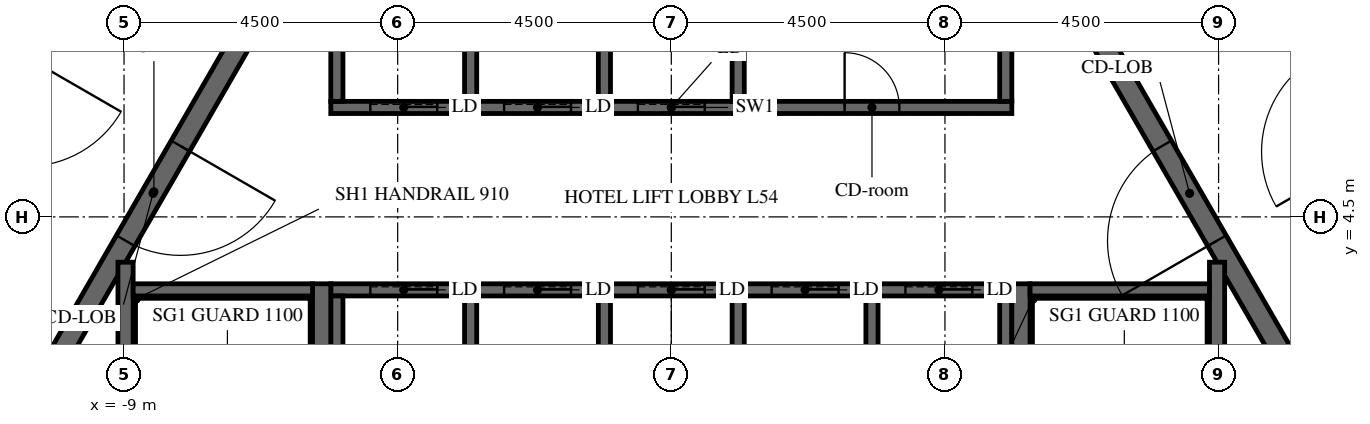
"""IFC4 building model, lengths in metres.
Left out: names, types, materials, properties, quantities, classifications, styles, units other than length and angle.
Written with IfcOpenShell. Run it as: python <this file> out.ifc"""

import sys

from ifc_helpers import new_model, si_unit, direction, frame, frame_2d, origin, place, context, subcontext, project, spatial, polyline, rectangle, outline, extrude, element, fill, save


model = new_model("IFC4")
c1 = context("Model", 3, precision=1e-05, world=origin(), true_north=direction((0.0, 1.0)))
c2 = subcontext(c1, "Body", "Model", "MODEL_VIEW")
j1 = project(units=[si_unit("LENGTHUNIT", "METRE"), si_unit("PLANEANGLEUNIT", "RADIAN")], contexts=[c1])
p1 = place(None, origin())
s1 = spatial("IfcSite", under=j1, at=p1, CompositionType="ELEMENT")
p2 = place(p1, origin())
s2 = spatial("IfcBuilding", under=s1, at=p2, CompositionType="ELEMENT")
p3 = place(p2, frame((0.0, 0.0, 226.8)))
s3 = spatial("IfcBuildingStorey", under=s2, at=p3, CompositionType="ELEMENT", Elevation=226.8)
p4 = place(p3, frame((-7.361, 12.75, -0.15), z_axis=(0.0, 0.0, 1.0), x_axis=(-0.50000571537, -0.866022103989, 0.0)))
e1 = element("IfcWall", 1, at=p4, inside=s3, PredefinedType="SHEAR", context=c2, shape_type="SweptSolid", body=[
    extrude(outline(polyline([(-0.144, -0.25), (14.867, -0.25), (14.578, 0.25), (0.144, 0.25), (-0.144, -0.25)])), origin(), (0.0, 0.0, 1.0), 3.9),
])
p5 = place(p4, frame((6.49, 0.0, 0.15)))
e2 = element("IfcOpeningElement", 2, at=p5, cuts=e1, PredefinedType="OPENING", context=c2, shape_type="SweptSolid", body=[
    extrude(rectangle(XDim=1.8, YDim=2.4, at=frame_2d((0.9, 1.2))), frame((0.0, 0.26, 0.0), z_axis=(0.0, -1.0, 0.0), x_axis=(1.0, 0.0, 0.0)), (0.0, 0.0, 1.0), 0.52),
])
p6 = place(p3, frame((14.722, 0.0, -0.15), z_axis=(0.0, 0.0, 1.0), x_axis=(-0.50000571537, 0.866022103989, 0.0)))
e3 = element("IfcWall", 3, at=p6, inside=s3, PredefinedType="SHEAR", context=c2, shape_type="SweptSolid", body=[
    extrude(outline(polyline([(-0.144, -0.25), (14.867, -0.25), (14.578, 0.25), (0.144, 0.25), (-0.144, -0.25)])), origin(), (0.0, 0.0, 1.0), 3.9),
])
p7 = place(p6, frame((6.432, 0.0, 0.15)))
e4 = element("IfcOpeningElement", 4, at=p7, cuts=e3, PredefinedType="OPENING", context=c2, shape_type="SweptSolid", body=[
    extrude(rectangle(XDim=1.8, YDim=2.4, at=frame_2d((0.9, 1.2))), frame((0.0, 0.26, 0.0), z_axis=(0.0, -1.0, 0.0), x_axis=(1.0, 0.0, 0.0)), (0.0, 0.0, 1.0), 0.52),
])
p8 = place(p3, frame((-5.673, 9.825, -0.15), z_axis=(0.0, 0.0, 1.0), x_axis=(-0.499995046907, -0.866028263435, 0.0)))
e5 = element("IfcWall", 5, at=p8, inside=s3, PredefinedType="SHEAR", context=c2, shape_type="SweptSolid", body=[
    extrude(outline(polyline([(-0.101, -0.175), (11.446, -0.175), (11.244, 0.175), (0.101, 0.175), (-0.101, -0.175)])), origin(), (0.0, 0.0, 1.0), 3.9),
])
p9 = place(p8, frame((4.801, 0.0, 0.15)))
e6 = element("IfcOpeningElement", 6, at=p9, cuts=e5, PredefinedType="OPENING", context=c2, shape_type="SweptSolid", body=[
    extrude(rectangle(XDim=1.8, YDim=2.4, at=frame_2d((0.9, 1.2))), frame((0.0, 0.185, 0.0), z_axis=(0.0, -1.0, 0.0), x_axis=(1.0, 0.0, 0.0)), (0.0, 0.0, 1.0), 0.37),
])
p10 = place(p3, frame((11.345, 0.0, -0.15), z_axis=(0.0, 0.0, 1.0), x_axis=(-0.499995046907, 0.866028263435, 0.0)))
e7 = element("IfcWall", 7, at=p10, inside=s3, PredefinedType="SHEAR", context=c2, shape_type="SweptSolid", body=[
    extrude(outline(polyline([(-0.101, -0.175), (11.446, -0.175), (11.244, 0.175), (0.101, 0.175), (-0.101, -0.175)])), origin(), (0.0, 0.0, 1.0), 3.9),
])
p11 = place(p10, frame((4.744, 0.0, 0.15)))
e8 = element("IfcOpeningElement", 8, at=p11, cuts=e7, PredefinedType="OPENING", context=c2, shape_type="SweptSolid", body=[
    extrude(rectangle(XDim=1.8, YDim=2.4, at=frame_2d((0.9, 1.2))), frame((0.0, 0.185, 0.0), z_axis=(0.0, -1.0, 0.0), x_axis=(1.0, 0.0, 0.0)), (0.0, 0.0, 1.0), 0.37),
])
p12 = place(p3, frame((-5.6, 6.3, -0.25), z_axis=(0.0, 0.0, 1.0), x_axis=(1.0, 0.0, 0.0)))
e9 = element("IfcWall", 9, at=p12, inside=s3, PredefinedType="SHEAR", context=c2, shape_type="SweptSolid", body=[
    extrude(rectangle(XDim=11.2, YDim=0.2, at=frame_2d((5.6, 0.0))), origin(), (0.0, 0.0, 1.0), 3.9),
])
p13 = place(p12, frame((8.45, 0.0, 0.25)))
e10 = element("IfcOpeningElement", 10, at=p13, cuts=e9, PredefinedType="OPENING", context=c2, shape_type="SweptSolid", body=[
    extrude(rectangle(XDim=0.9, YDim=2.1, at=frame_2d((0.45, 1.05))), frame((0.0, 0.11, 0.0), z_axis=(0.0, -1.0, 0.0), x_axis=(1.0, 0.0, 0.0)), (0.0, 0.0, 1.0), 0.22),
])
p14 = place(p12, frame((0.65, 0.0, 0.25)))
e11 = element("IfcOpeningElement", 11, at=p14, cuts=e9, PredefinedType="OPENING", context=c2, shape_type="SweptSolid", body=[
    extrude(rectangle(XDim=1.1, YDim=2.1, at=frame_2d((0.55, 1.05))), frame((0.0, 0.11, 0.0), z_axis=(0.0, -1.0, 0.0), x_axis=(1.0, 0.0, 0.0)), (0.0, 0.0, 1.0), 0.22),
])
p15 = place(p12, frame((2.85, 0.0, 0.25)))
e12 = element("IfcOpeningElement", 12, at=p15, cuts=e9, PredefinedType="OPENING", context=c2, shape_type="SweptSolid", body=[
    extrude(rectangle(XDim=1.1, YDim=2.1, at=frame_2d((0.55, 1.05))), frame((0.0, 0.11, 0.0), z_axis=(0.0, -1.0, 0.0), x_axis=(1.0, 0.0, 0.0)), (0.0, 0.0, 1.0), 0.22),
])
p16 = place(p12, frame((5.05, 0.0, 0.25)))
e13 = element("IfcOpeningElement", 13, at=p16, cuts=e9, PredefinedType="OPENING", context=c2, shape_type="SweptSolid", body=[
    extrude(rectangle(XDim=1.1, YDim=2.1, at=frame_2d((0.55, 1.05))), frame((0.0, 0.11, 0.0), z_axis=(0.0, -1.0, 0.0), x_axis=(1.0, 0.0, 0.0)), (0.0, 0.0, 1.0), 0.22),
])
for number, where, z_axis, x_axis in (
    (14, (-5.5, 6.4, -0.25), (0.0, 0.0, 1.0), (0.0, 1.0, 0.0)),
    (15, (-3.3, 6.4, -0.25), (0.0, 0.0, 1.0), (0.0, 1.0, 0.0)),
    (16, (-1.1, 6.4, -0.25), (0.0, 0.0, 1.0), (0.0, 1.0, 0.0)),
    (17, (1.1, 6.4, -0.25), (0.0, 0.0, 1.0), (0.0, 1.0, 0.0)),
    (18, (5.5, 6.4, -0.25), (0.0, 0.0, 1.0), (0.0, 1.0, 0.0)),
):
    element("IfcWall", number, at=place(p3, frame(where, z_axis=z_axis, x_axis=x_axis)), inside=s3, PredefinedType="SHEAR", context=c2, shape_type="SweptSolid", body=[
        extrude(rectangle(XDim=2.9, YDim=0.2, at=frame_2d((1.45, 0.0))), origin(), (0.0, 0.0, 1.0), 3.9),
    ])
p17 = place(p3, frame((-5.6, 3.3, -0.25), z_axis=(0.0, 0.0, 1.0), x_axis=(1.0, 0.0, 0.0)))
e19 = element("IfcWall", 19, at=p17, inside=s3, PredefinedType="SHEAR", context=c2, shape_type="SweptSolid", body=[
    extrude(rectangle(XDim=11.2, YDim=0.2, at=frame_2d((5.6, 0.0))), origin(), (0.0, 0.0, 1.0), 3.9),
])
p18 = place(p17, frame((0.65, 0.0, 0.25)))
e20 = element("IfcOpeningElement", 20, at=p18, cuts=e19, PredefinedType="OPENING", context=c2, shape_type="SweptSolid", body=[
    extrude(rectangle(XDim=1.1, YDim=2.1, at=frame_2d((0.55, 1.05))), frame((0.0, 0.11, 0.0), z_axis=(0.0, -1.0, 0.0), x_axis=(1.0, 0.0, 0.0)), (0.0, 0.0, 1.0), 0.22),
])
p19 = place(p17, frame((2.85, 0.0, 0.25)))
e21 = element("IfcOpeningElement", 21, at=p19, cuts=e19, PredefinedType="OPENING", context=c2, shape_type="SweptSolid", body=[
    extrude(rectangle(XDim=1.1, YDim=2.1, at=frame_2d((0.55, 1.05))), frame((0.0, 0.11, 0.0), z_axis=(0.0, -1.0, 0.0), x_axis=(1.0, 0.0, 0.0)), (0.0, 0.0, 1.0), 0.22),
])
p20 = place(p17, frame((5.05, 0.0, 0.25)))
e22 = element("IfcOpeningElement", 22, at=p20, cuts=e19, PredefinedType="OPENING", context=c2, shape_type="SweptSolid", body=[
    extrude(rectangle(XDim=1.1, YDim=2.1, at=frame_2d((0.55, 1.05))), frame((0.0, 0.11, 0.0), z_axis=(0.0, -1.0, 0.0), x_axis=(1.0, 0.0, 0.0)), (0.0, 0.0, 1.0), 0.22),
])
p21 = place(p17, frame((7.25, 0.0, 0.25)))
e23 = element("IfcOpeningElement", 23, at=p21, cuts=e19, PredefinedType="OPENING", context=c2, shape_type="SweptSolid", body=[
    extrude(rectangle(XDim=1.1, YDim=2.1, at=frame_2d((0.55, 1.05))), frame((0.0, 0.11, 0.0), z_axis=(0.0, -1.0, 0.0), x_axis=(1.0, 0.0, 0.0)), (0.0, 0.0, 1.0), 0.22),
])
p22 = place(p17, frame((9.45, 0.0, 0.25)))
e24 = element("IfcOpeningElement", 24, at=p22, cuts=e19, PredefinedType="OPENING", context=c2, shape_type="SweptSolid", body=[
    extrude(rectangle(XDim=1.1, YDim=2.1, at=frame_2d((0.55, 1.05))), frame((0.0, 0.11, 0.0), z_axis=(0.0, -1.0, 0.0), x_axis=(1.0, 0.0, 0.0)), (0.0, 0.0, 1.0), 0.22),
])
for number, where, z_axis, x_axis in (
    (25, (-5.5, 0.1, -0.25), (0.0, 0.0, 1.0), (0.0, 1.0, 0.0)),
    (26, (-3.3, 0.1, -0.25), (0.0, 0.0, 1.0), (0.0, 1.0, 0.0)),
    (27, (-1.1, 0.1, -0.25), (0.0, 0.0, 1.0), (0.0, 1.0, 0.0)),
    (28, (1.1, 0.1, -0.25), (0.0, 0.0, 1.0), (0.0, 1.0, 0.0)),
    (29, (3.3, 0.1, -0.25), (0.0, 0.0, 1.0), (0.0, 1.0, 0.0)),
    (30, (5.5, 0.1, -0.25), (0.0, 0.0, 1.0), (0.0, 1.0, 0.0)),
):
    element("IfcWall", number, at=place(p3, frame(where, z_axis=z_axis, x_axis=x_axis)), inside=s3, PredefinedType="SHEAR", context=c2, shape_type="SweptSolid", body=[
        extrude(rectangle(XDim=3.1, YDim=0.2, at=frame_2d((1.55, 0.0))), origin(), (0.0, 0.0, 1.0), 3.9),
    ])
p23 = place(p3, frame((5.75, -3.4, -0.25), z_axis=(0.0, 0.0, 1.0), x_axis=(0.0, 1.0, 0.0)))
e31 = element("IfcWall", 31, at=p23, inside=s3, PredefinedType="SHEAR", context=c2, shape_type="SweptSolid", body=[
    extrude(rectangle(XDim=6.8, YDim=0.3, at=frame_2d((3.4, 0.0))), origin(), (0.0, 0.0, 1.0), 3.9),
])
p24 = place(p3, frame((8.975, -3.755, -0.25), z_axis=(0.0, 0.0, 1.0), x_axis=(0.0, 1.0, 0.0)))
e32 = element("IfcWall", 32, at=p24, inside=s3, PredefinedType="SHEAR", context=c2, shape_type="SweptSolid", body=[
    extrude(rectangle(XDim=7.51, YDim=0.25, at=frame_2d((3.755, 0.0))), origin(), (0.0, 0.0, 1.0), 3.9),
])
p25 = place(p3, frame((5.9, 3.3, -0.25), z_axis=(0.0, 0.0, 1.0), x_axis=(1.0, 0.0, 0.0)))
e33 = element("IfcWall", 33, at=p25, inside=s3, PredefinedType="SHEAR", context=c2, shape_type="SweptSolid", body=[
    extrude(rectangle(XDim=2.95, YDim=0.2, at=frame_2d((1.475, 0.0))), origin(), (0.0, 0.0, 1.0), 3.9),
])
p26 = place(p3, frame((-5.75, -3.4, -0.25), z_axis=(0.0, 0.0, 1.0), x_axis=(0.0, 1.0, 0.0)))
e34 = element("IfcWall", 34, at=p26, inside=s3, PredefinedType="SHEAR", context=c2, shape_type="SweptSolid", body=[
    extrude(rectangle(XDim=6.8, YDim=0.3, at=frame_2d((3.4, 0.0))), origin(), (0.0, 0.0, 1.0), 3.9),
])
p27 = place(p3, frame((-8.975, -3.755, -0.25), z_axis=(0.0, 0.0, 1.0), x_axis=(0.0, 1.0, 0.0)))
e35 = element("IfcWall", 35, at=p27, inside=s3, PredefinedType="SHEAR", context=c2, shape_type="SweptSolid", body=[
    extrude(rectangle(XDim=7.51, YDim=0.25, at=frame_2d((3.755, 0.0))), origin(), (0.0, 0.0, 1.0), 3.9),
])
p28 = place(p3, frame((-8.85, 3.3, -0.25), z_axis=(0.0, 0.0, 1.0), x_axis=(1.0, 0.0, 0.0)))
e36 = element("IfcWall", 36, at=p28, inside=s3, PredefinedType="SHEAR", context=c2, shape_type="SweptSolid", body=[
    extrude(rectangle(XDim=2.95, YDim=0.2, at=frame_2d((1.475, 0.0))), origin(), (0.0, 0.0, 1.0), 3.9),
])
p29 = place(p3, frame((-8.588, 14.725, 0.0), z_axis=(0.0, 0.0, 1.0), x_axis=(-0.499999926766, -0.866025446066, 0.0)))
e37 = element("IfcWall", 37, at=p29, inside=s3, PredefinedType="PARTITIONING", context=c2, shape_type="SweptSolid", body=[
    extrude(rectangle(XDim=13.786, YDim=0.15, at=frame_2d((6.893, 0.0))), origin(), (0.0, 0.0, 1.0), 2.988),
])
p30 = place(p29, frame((4.276, 0.0, 0.0)))
e38 = element("IfcOpeningElement", 38, at=p30, cuts=e37, PredefinedType="OPENING", context=c2, shape_type="SweptSolid", body=[
    extrude(rectangle(XDim=1.0, YDim=2.1, at=frame_2d((0.5, 1.05))), frame((0.0, 0.085, 0.0), z_axis=(0.0, -1.0, 0.0), x_axis=(1.0, 0.0, 0.0)), (0.0, 0.0, 1.0), 0.17),
])
p31 = place(p29, frame((11.073, 0.0, 0.0)))
e39 = element("IfcOpeningElement", 39, at=p31, cuts=e37, PredefinedType="OPENING", context=c2, shape_type="SweptSolid", body=[
    extrude(rectangle(XDim=1.0, YDim=2.1, at=frame_2d((0.5, 1.05))), frame((0.0, 0.085, 0.0), z_axis=(0.0, -1.0, 0.0), x_axis=(1.0, 0.0, 0.0)), (0.0, 0.0, 1.0), 0.17),
])
p32 = place(p3, frame((17.046, 0.075, 0.0), z_axis=(0.0, 0.0, 1.0), x_axis=(-0.499996322767, 0.866027526826, 0.0)))
e40 = element("IfcWall", 40, at=p32, inside=s3, PredefinedType="PARTITIONING", context=c2, shape_type="SweptSolid", body=[
    extrude(rectangle(XDim=14.636, YDim=0.15, at=frame_2d((7.318, 0.0))), origin(), (0.0, 0.0, 1.0), 2.988),
])
p33 = place(p32, frame((1.781, 0.0, 0.0)))
e41 = element("IfcOpeningElement", 41, at=p33, cuts=e40, PredefinedType="OPENING", context=c2, shape_type="SweptSolid", body=[
    extrude(rectangle(XDim=1.0, YDim=2.1, at=frame_2d((0.5, 1.05))), frame((0.0, 0.085, 0.0), z_axis=(0.0, -1.0, 0.0), x_axis=(1.0, 0.0, 0.0)), (0.0, 0.0, 1.0), 0.17),
])
p34 = place(p32, frame((7.872, 0.0, 0.0)))
e42 = element("IfcOpeningElement", 42, at=p34, cuts=e40, PredefinedType="OPENING", context=c2, shape_type="SweptSolid", body=[
    extrude(rectangle(XDim=1.0, YDim=2.1, at=frame_2d((0.5, 1.05))), frame((0.0, 0.085, 0.0), z_axis=(0.0, -1.0, 0.0), x_axis=(1.0, 0.0, 0.0)), (0.0, 0.0, 1.0), 0.17),
])
p35 = place(p32, frame((13.203, 0.0, 0.0)))
e43 = element("IfcOpeningElement", 43, at=p35, cuts=e40, PredefinedType="OPENING", context=c2, shape_type="SweptSolid", body=[
    extrude(rectangle(XDim=1.0, YDim=2.1, at=frame_2d((0.5, 1.05))), frame((0.0, 0.085, 0.0), z_axis=(0.0, -1.0, 0.0), x_axis=(1.0, 0.0, 0.0)), (0.0, 0.0, 1.0), 0.17),
])
p36 = place(p9, origin())
e44 = element("IfcDoor", 44, at=p36, inside=s3, OperationType="DOUBLE_DOOR_SINGLE_SWING", PredefinedType="DOOR", context=c2, shape_type="SweptSolid", body=[
    extrude(rectangle(XDim=1.8, YDim=2.4, at=frame_2d((0.9, 1.2))), frame((0.0, 0.025, 0.0), z_axis=(0.0, -1.0, 0.0), x_axis=(1.0, 0.0, 0.0)), (0.0, 0.0, 1.0), 0.05),
])
fill(e6, e44)
p37 = place(p11, origin())
e45 = element("IfcDoor", 45, at=p37, inside=s3, OperationType="DOUBLE_DOOR_SINGLE_SWING", PredefinedType="DOOR", context=c2, shape_type="SweptSolid", body=[
    extrude(rectangle(XDim=1.8, YDim=2.4, at=frame_2d((0.9, 1.2))), frame((0.0, 0.025, 0.0), z_axis=(0.0, -1.0, 0.0), x_axis=(1.0, 0.0, 0.0)), (0.0, 0.0, 1.0), 0.05),
])
fill(e8, e45)
p38 = place(p13, origin())
e46 = element("IfcDoor", 46, at=p38, inside=s3, OperationType="SINGLE_SWING_LEFT", PredefinedType="DOOR", context=c2, shape_type="SweptSolid", body=[
    extrude(rectangle(XDim=0.9, YDim=2.1, at=frame_2d((0.45, 1.05))), frame((0.0, 0.025, 0.0), z_axis=(0.0, -1.0, 0.0), x_axis=(1.0, 0.0, 0.0)), (0.0, 0.0, 1.0), 0.05),
])
fill(e10, e46)
p39 = place(p14, origin())
e47 = element("IfcDoor", 47, at=p39, inside=s3, OperationType="SLIDING_TO_LEFT", PredefinedType="DOOR", context=c2, shape_type="SweptSolid", body=[
    extrude(rectangle(XDim=1.1, YDim=2.1, at=frame_2d((0.55, 1.05))), frame((0.0, 0.025, 0.0), z_axis=(0.0, -1.0, 0.0), x_axis=(1.0, 0.0, 0.0)), (0.0, 0.0, 1.0), 0.05),
])
fill(e11, e47)
p40 = place(p15, origin())
e48 = element("IfcDoor", 48, at=p40, inside=s3, OperationType="SLIDING_TO_LEFT", PredefinedType="DOOR", context=c2, shape_type="SweptSolid", body=[
    extrude(rectangle(XDim=1.1, YDim=2.1, at=frame_2d((0.55, 1.05))), frame((0.0, 0.025, 0.0), z_axis=(0.0, -1.0, 0.0), x_axis=(1.0, 0.0, 0.0)), (0.0, 0.0, 1.0), 0.05),
])
fill(e12, e48)
p41 = place(p16, origin())
e49 = element("IfcDoor", 49, at=p41, inside=s3, OperationType="SLIDING_TO_LEFT", PredefinedType="DOOR", context=c2, shape_type="SweptSolid", body=[
    extrude(rectangle(XDim=1.1, YDim=2.1, at=frame_2d((0.55, 1.05))), frame((0.0, 0.025, 0.0), z_axis=(0.0, -1.0, 0.0), x_axis=(1.0, 0.0, 0.0)), (0.0, 0.0, 1.0), 0.05),
])
fill(e13, e49)
p42 = place(p18, origin())
e50 = element("IfcDoor", 50, at=p42, inside=s3, OperationType="SLIDING_TO_LEFT", PredefinedType="DOOR", context=c2, shape_type="SweptSolid", body=[
    extrude(rectangle(XDim=1.1, YDim=2.1, at=frame_2d((0.55, 1.05))), frame((0.0, 0.025, 0.0), z_axis=(0.0, -1.0, 0.0), x_axis=(1.0, 0.0, 0.0)), (0.0, 0.0, 1.0), 0.05),
])
fill(e20, e50)
p43 = place(p19, origin())
e51 = element("IfcDoor", 51, at=p43, inside=s3, OperationType="SLIDING_TO_LEFT", PredefinedType="DOOR", context=c2, shape_type="SweptSolid", body=[
    extrude(rectangle(XDim=1.1, YDim=2.1, at=frame_2d((0.55, 1.05))), frame((0.0, 0.025, 0.0), z_axis=(0.0, -1.0, 0.0), x_axis=(1.0, 0.0, 0.0)), (0.0, 0.0, 1.0), 0.05),
])
fill(e21, e51)
p44 = place(p20, origin())
e52 = element("IfcDoor", 52, at=p44, inside=s3, OperationType="SLIDING_TO_LEFT", PredefinedType="DOOR", context=c2, shape_type="SweptSolid", body=[
    extrude(rectangle(XDim=1.1, YDim=2.1, at=frame_2d((0.55, 1.05))), frame((0.0, 0.025, 0.0), z_axis=(0.0, -1.0, 0.0), x_axis=(1.0, 0.0, 0.0)), (0.0, 0.0, 1.0), 0.05),
])
fill(e22, e52)
p45 = place(p21, origin())
e53 = element("IfcDoor", 53, at=p45, inside=s3, OperationType="SLIDING_TO_LEFT", PredefinedType="DOOR", context=c2, shape_type="SweptSolid", body=[
    extrude(rectangle(XDim=1.1, YDim=2.1, at=frame_2d((0.55, 1.05))), frame((0.0, 0.025, 0.0), z_axis=(0.0, -1.0, 0.0), x_axis=(1.0, 0.0, 0.0)), (0.0, 0.0, 1.0), 0.05),
])
fill(e23, e53)
p46 = place(p22, origin())
e54 = element("IfcDoor", 54, at=p46, inside=s3, OperationType="SLIDING_TO_LEFT", PredefinedType="DOOR", context=c2, shape_type="SweptSolid", body=[
    extrude(rectangle(XDim=1.1, YDim=2.1, at=frame_2d((0.55, 1.05))), frame((0.0, 0.025, 0.0), z_axis=(0.0, -1.0, 0.0), x_axis=(1.0, 0.0, 0.0)), (0.0, 0.0, 1.0), 0.05),
])
fill(e24, e54)
save(model, sys.argv[1])
